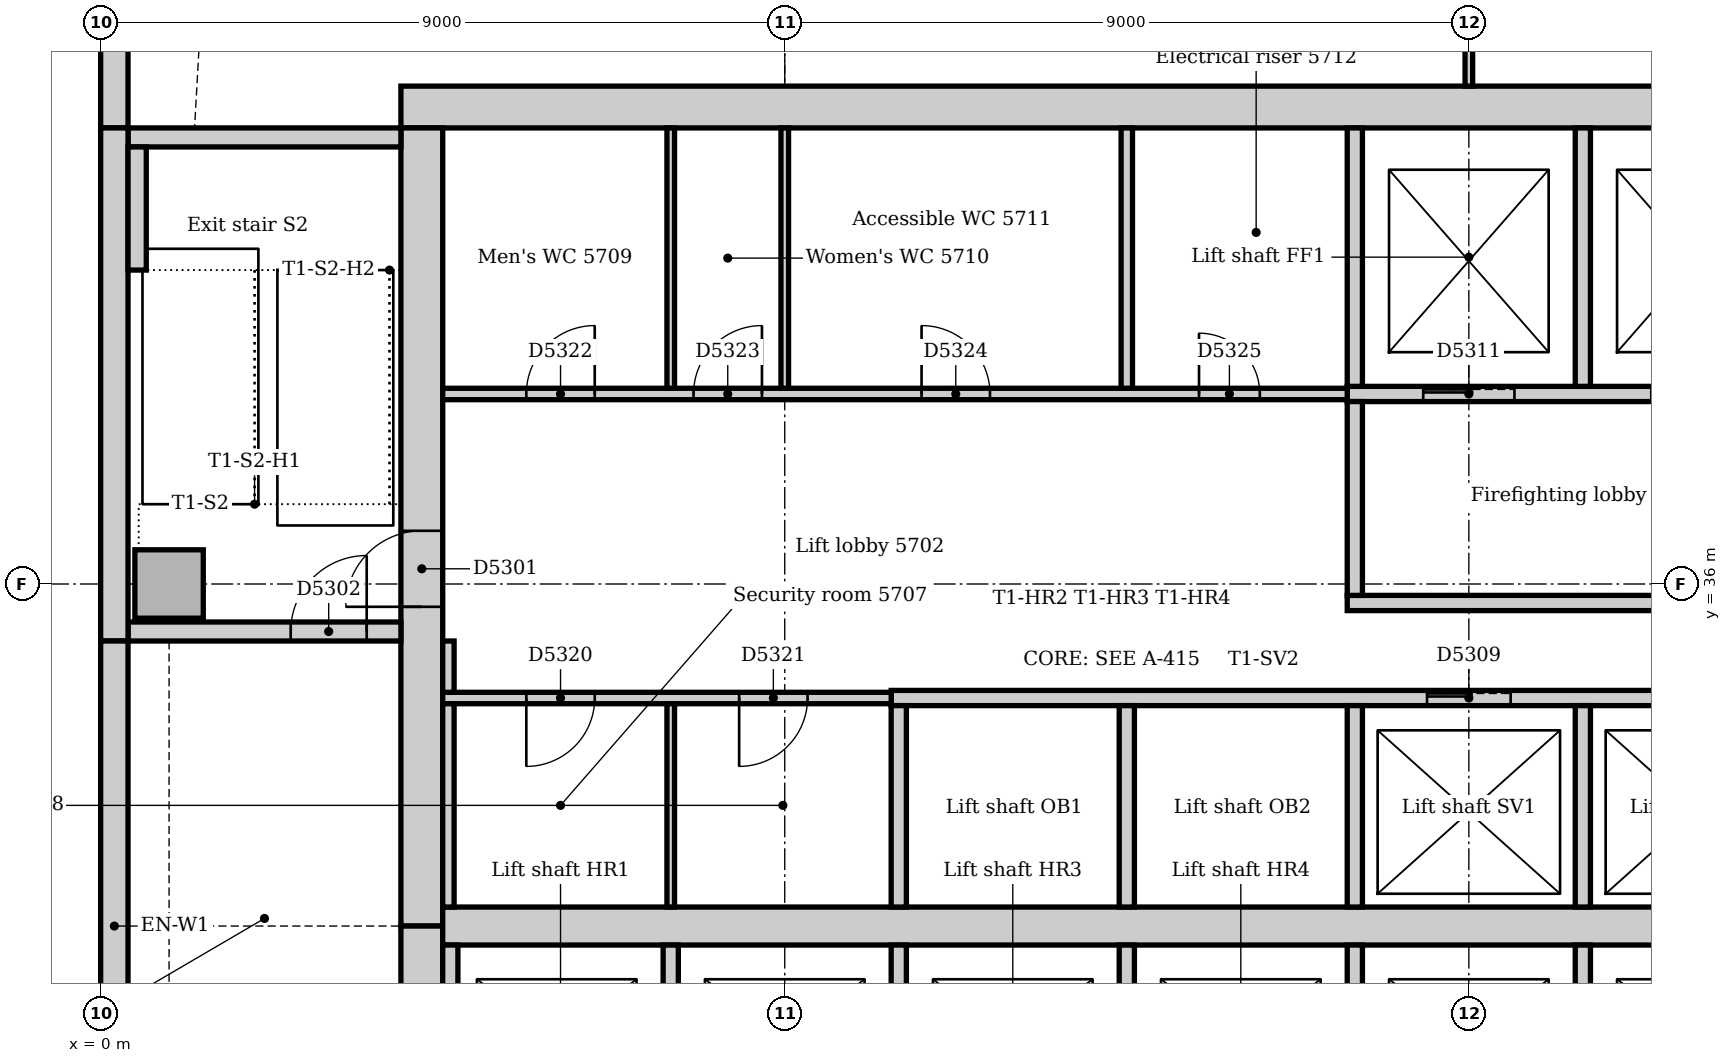
"""IFC4 building model, lengths in metres.
Left out: names, types, materials, properties, quantities, classifications, styles, units other than length and angle.
Written with IfcOpenShell. Run it as: python <this file> out.ifc"""

import sys

from ifc_helpers import new_model, si_unit, direction, frame, frame_2d, origin, origin_2d, place, context, subcontext, project, spatial, rectangle, extrude, element, fill, save


model = new_model("IFC4")
c1 = context("Model", 3, precision=1e-05, world=origin(), true_north=direction((0.0, 1.0)))
c2 = subcontext(c1, "Body", "Model", "MODEL_VIEW")
j1 = project(units=[si_unit("LENGTHUNIT", "METRE"), si_unit("PLANEANGLEUNIT", "RADIAN")], contexts=[c1])
p1 = place(None, origin())
s1 = spatial("IfcSite", under=j1, at=p1, CompositionType="ELEMENT")
p2 = place(p1, origin())
s2 = spatial("IfcBuilding", under=s1, at=p2, CompositionType="ELEMENT")
p3 = place(p2, frame((0.0, 0.0, 238.0)))
s3 = spatial("IfcBuildingStorey", under=s2, at=p3, CompositionType="ELEMENT", Elevation=238.0)
p4 = place(p3, frame((23.05, 42.275, 0.0), z_axis=(0.0, 0.0, 1.0), x_axis=(-1.0, 0.0, 0.0)))
e1 = element("IfcWall", 1, at=p4, inside=s3, PredefinedType="SOLIDWALL", context=c2, shape_type="SweptSolid", body=[
    extrude(rectangle(XDim=19.1, YDim=0.55, at=frame_2d((9.55, 0.0))), origin(), (0.0, 0.0, 1.0), 4.0),
])
p5 = place(p3, frame((4.225, 42.0, 0.0), z_axis=(0.0, 0.0, 1.0), x_axis=(0.0, -1.0, 0.0)))
e2 = element("IfcWall", 2, at=p5, inside=s3, PredefinedType="SOLIDWALL", context=c2, shape_type="SweptSolid", body=[
    extrude(rectangle(XDim=10.5, YDim=0.55, at=frame_2d((5.25, 0.0))), origin(), (0.0, 0.0, 1.0), 4.0),
])
p6 = place(p5, frame((5.3, 0.0, 0.0)))
e3 = element("IfcOpeningElement", 3, at=p6, cuts=e2, PredefinedType="OPENING", context=c2, shape_type="SweptSolid", body=[
    extrude(rectangle(XDim=1.0, YDim=2.1, at=frame_2d((0.5, 1.05))), frame((0.0, 0.285, 0.0), z_axis=(0.0, -1.0, 0.0), x_axis=(1.0, 0.0, 0.0)), (0.0, 0.0, 1.0), 0.57),
])
p7 = place(p3, frame((4.225, 31.5, 0.0), z_axis=(0.0, 0.0, 1.0), x_axis=(0.0, -1.0, 0.0)))
e4 = element("IfcWall", 4, at=p7, inside=s3, PredefinedType="SOLIDWALL", context=c2, shape_type="SweptSolid", body=[
    extrude(rectangle(XDim=10.5, YDim=0.55, at=frame_2d((5.25, 0.0))), origin(), (0.0, 0.0, 1.0), 4.0),
])
p8 = place(p7, frame((4.25, 0.0, 0.0)))
e5 = element("IfcOpeningElement", 5, at=p8, cuts=e4, PredefinedType="OPENING", context=c2, shape_type="SweptSolid", body=[
    extrude(rectangle(XDim=1.0, YDim=2.1, at=frame_2d((0.5, 1.05))), frame((0.0, 0.285, 0.0), z_axis=(0.0, -1.0, 0.0), x_axis=(1.0, 0.0, 0.0)), (0.0, 0.0, 1.0), 0.57),
])
p9 = place(p3, frame((4.5, 31.5, 0.0), z_axis=(0.0, 0.0, 1.0), x_axis=(1.0, 0.0, 0.0)))
e6 = element("IfcWall", 6, at=p9, inside=s3, PredefinedType="SOLIDWALL", context=c2, shape_type="SweptSolid", body=[
    extrude(rectangle(XDim=18.0, YDim=0.5, at=frame_2d((9.0, 0.0))), origin(), (0.0, 0.0, 1.0), 4.0),
])
p10 = place(p3, frame((0.36, 35.375, 0.0), z_axis=(0.0, 0.0, 1.0), x_axis=(1.0, 0.0, 0.0)))
e7 = element("IfcWall", 7, at=p10, inside=s3, PredefinedType="SOLIDWALL", context=c2, shape_type="SweptSolid", body=[
    extrude(rectangle(XDim=3.59, YDim=0.25, at=frame_2d((1.795, 0.0))), origin(), (0.0, 0.0, 1.0), 4.0),
])
p11 = place(p10, frame((2.14, 0.0, 0.0)))
e8 = element("IfcOpeningElement", 8, at=p11, cuts=e7, PredefinedType="OPENING", context=c2, shape_type="SweptSolid", body=[
    extrude(rectangle(XDim=1.0, YDim=2.1, at=frame_2d((0.5, 1.05))), frame((0.0, 0.135, 0.0), z_axis=(0.0, -1.0, 0.0), x_axis=(1.0, 0.0, 0.0)), (0.0, 0.0, 1.0), 0.27),
])
p12 = place(p3, frame((3.95, 41.875, 0.0), z_axis=(0.0, 0.0, 1.0), x_axis=(-1.0, 0.0, 0.0)))
e9 = element("IfcWall", 9, at=p12, inside=s3, PredefinedType="SOLIDWALL", context=c2, shape_type="SweptSolid", body=[
    extrude(rectangle(XDim=3.59, YDim=0.25, at=frame_2d((1.795, 0.0))), origin(), (0.0, 0.0, 1.0), 4.0),
])
p13 = place(p3, frame((0.9, 36.0, 0.0), z_axis=(0.0, 0.0, 1.0), x_axis=(1.0, 0.0, 0.0)))
e10 = element("IfcColumn", 10, at=p13, inside=s3, PredefinedType="COLUMN", context=c2, shape_type="SweptSolid", body=[
    extrude(rectangle(XDim=0.9, YDim=0.9, at=origin_2d()), origin(), (0.0, 0.0, 1.0), 4.0),
])
p14 = place(p3, frame((0.18, 54.257, 0.0), z_axis=(0.0, 0.0, 1.0), x_axis=(0.0, -1.0, 0.0)))
e11 = element("IfcWall", 11, at=p14, inside=s3, PredefinedType="STANDARD", context=c2, shape_type="SweptSolid", body=[
    extrude(rectangle(XDim=12.257, YDim=0.36, at=frame_2d((6.129, 0.0))), origin(), (0.0, 0.0, 1.0), 3.7),
])
p15 = place(p14, frame((4.207, 0.0, 0.9)))
e12 = element("IfcOpeningElement", 12, at=p15, cuts=e11, PredefinedType="OPENING", context=c2, shape_type="SweptSolid", body=[
    extrude(rectangle(XDim=1.8, YDim=1.6, at=frame_2d((0.9, 0.8))), frame((0.0, 0.19, 0.0), z_axis=(0.0, -1.0, 0.0), x_axis=(1.0, 0.0, 0.0)), (0.0, 0.0, 1.0), 0.38),
])
p16 = place(p14, frame((7.607, 0.0, 0.9)))
e13 = element("IfcOpeningElement", 13, at=p16, cuts=e11, PredefinedType="OPENING", context=c2, shape_type="SweptSolid", body=[
    extrude(rectangle(XDim=3.3, YDim=1.6, at=frame_2d((1.65, 0.8))), frame((0.0, 0.19, 0.0), z_axis=(0.0, -1.0, 0.0), x_axis=(1.0, 0.0, 0.0)), (0.0, 0.0, 1.0), 0.38),
])
p17 = place(p3, frame((0.18, 42.0, 0.0), z_axis=(0.0, 0.0, 1.0), x_axis=(0.0, -1.0, 0.0)))
e14 = element("IfcWall", 14, at=p17, inside=s3, PredefinedType="STANDARD", context=c2, shape_type="SweptSolid", body=[
    extrude(rectangle(XDim=6.75, YDim=0.36, at=frame_2d((3.375, 0.0))), origin(), (0.0, 0.0, 1.0), 3.7),
])
p18 = place(p3, frame((0.18, 35.25, 0.0), z_axis=(0.0, 0.0, 1.0), x_axis=(0.0, -1.0, 0.0)))
e15 = element("IfcWall", 15, at=p18, inside=s3, PredefinedType="STANDARD", context=c2, shape_type="SweptSolid", body=[
    extrude(rectangle(XDim=7.5, YDim=0.36, at=frame_2d((3.75, 0.0))), origin(), (0.0, 0.0, 1.0), 3.7),
])
p19 = place(p3, frame((0.48, 40.13, 0.0), z_axis=(0.0, 0.0, 1.0), x_axis=(0.0, 1.0, 0.0)))
e16 = element("IfcWall", 16, at=p19, inside=s3, PredefinedType="STANDARD", context=c2, shape_type="SweptSolid", body=[
    extrude(rectangle(XDim=1.62, YDim=0.24, at=frame_2d((0.81, 0.0))), origin(), (0.0, 0.0, 1.0), 4.0),
])
p20 = place(p3, frame((16.4, 35.75, 0.0), z_axis=(0.0, 0.0, 1.0), x_axis=(1.0, 0.0, 0.0)))
e17 = element("IfcWall", 17, at=p20, inside=s3, PredefinedType="PARTITIONING", context=c2, shape_type="SweptSolid", body=[
    extrude(rectangle(XDim=6.1, YDim=0.2, at=frame_2d((3.05, 0.0))), origin(), (0.0, 0.0, 1.0), 3.7),
])
p21 = place(p3, frame((16.4, 38.5, 0.0), z_axis=(0.0, 0.0, 1.0), x_axis=(1.0, 0.0, 0.0)))
e18 = element("IfcWall", 18, at=p21, inside=s3, PredefinedType="PARTITIONING", context=c2, shape_type="SweptSolid", body=[
    extrude(rectangle(XDim=6.1, YDim=0.2, at=frame_2d((3.05, 0.0))), origin(), (0.0, 0.0, 1.0), 3.7),
])
p22 = place(p21, frame((1.0, 0.0, 0.0)))
e19 = element("IfcOpeningElement", 19, at=p22, cuts=e18, PredefinedType="OPENING", context=c2, shape_type="SweptSolid", body=[
    extrude(rectangle(XDim=1.2, YDim=2.1, at=frame_2d((0.6, 1.05))), frame((0.0, 0.11, 0.0), z_axis=(0.0, -1.0, 0.0), x_axis=(1.0, 0.0, 0.0)), (0.0, 0.0, 1.0), 0.22),
])
p23 = place(p21, frame((4.0, 0.0, 0.0)))
e20 = element("IfcOpeningElement", 20, at=p23, cuts=e18, PredefinedType="OPENING", context=c2, shape_type="SweptSolid", body=[
    extrude(rectangle(XDim=1.2, YDim=2.1, at=frame_2d((0.6, 1.05))), frame((0.0, 0.11, 0.0), z_axis=(0.0, -1.0, 0.0), x_axis=(1.0, 0.0, 0.0)), (0.0, 0.0, 1.0), 0.22),
])
p24 = place(p3, frame((16.5, 35.85, 0.0), z_axis=(0.0, 0.0, 1.0), x_axis=(0.0, 1.0, 0.0)))
e21 = element("IfcWall", 21, at=p24, inside=s3, PredefinedType="PARTITIONING", context=c2, shape_type="SweptSolid", body=[
    extrude(rectangle(XDim=2.55, YDim=0.2, at=frame_2d((1.275, 0.0))), origin(), (0.0, 0.0, 1.0), 3.7),
])
p25 = place(p3, frame((10.4, 34.5, 0.0), z_axis=(0.0, 0.0, 1.0), x_axis=(1.0, 0.0, 0.0)))
e22 = element("IfcWall", 22, at=p25, inside=s3, PredefinedType="PARTITIONING", context=c2, shape_type="SweptSolid", body=[
    extrude(rectangle(XDim=12.1, YDim=0.2, at=frame_2d((6.05, 0.0))), origin(), (0.0, 0.0, 1.0), 3.7),
])
p26 = place(p25, frame((7.05, 0.0, 0.0)))
e23 = element("IfcOpeningElement", 23, at=p26, cuts=e22, PredefinedType="OPENING", context=c2, shape_type="SweptSolid", body=[
    extrude(rectangle(XDim=1.1, YDim=2.1, at=frame_2d((0.55, 1.05))), frame((0.0, 0.11, 0.0), z_axis=(0.0, -1.0, 0.0), x_axis=(1.0, 0.0, 0.0)), (0.0, 0.0, 1.0), 0.22),
])
p27 = place(p25, frame((10.05, 0.0, 0.0)))
e24 = element("IfcOpeningElement", 24, at=p27, cuts=e22, PredefinedType="OPENING", context=c2, shape_type="SweptSolid", body=[
    extrude(rectangle(XDim=1.1, YDim=2.1, at=frame_2d((0.55, 1.05))), frame((0.0, 0.11, 0.0), z_axis=(0.0, -1.0, 0.0), x_axis=(1.0, 0.0, 0.0)), (0.0, 0.0, 1.0), 0.22),
])
for number, where, z_axis, x_axis in (
    (25, (10.5, 28.6, 0.0), (0.0, 0.0, 1.0), (0.0, 1.0, 0.0)),
    (26, (10.5, 31.75, 0.0), (0.0, 0.0, 1.0), (0.0, 1.0, 0.0)),
    (27, (13.5, 28.6, 0.0), (0.0, 0.0, 1.0), (0.0, 1.0, 0.0)),
    (28, (13.5, 31.75, 0.0), (0.0, 0.0, 1.0), (0.0, 1.0, 0.0)),
    (29, (16.5, 28.6, 0.0), (0.0, 0.0, 1.0), (0.0, 1.0, 0.0)),
    (30, (16.5, 31.75, 0.0), (0.0, 0.0, 1.0), (0.0, 1.0, 0.0)),
    (31, (19.5, 28.6, 0.0), (0.0, 0.0, 1.0), (0.0, 1.0, 0.0)),
    (32, (19.5, 31.75, 0.0), (0.0, 0.0, 1.0), (0.0, 1.0, 0.0)),
):
    element("IfcWall", number, at=place(p3, frame(where, z_axis=z_axis, x_axis=x_axis)), inside=s3, PredefinedType="PARTITIONING", context=c2, shape_type="SweptSolid", body=[
        extrude(rectangle(XDim=2.65, YDim=0.2, at=frame_2d((1.325, 0.0))), origin(), (0.0, 0.0, 1.0), 3.7),
    ])
for number, where, z_axis, x_axis in (
    (33, (16.5, 38.6, 0.0), (0.0, 0.0, 1.0), (0.0, 1.0, 0.0)),
    (34, (19.5, 38.6, 0.0), (0.0, 0.0, 1.0), (0.0, 1.0, 0.0)),
):
    element("IfcWall", number, at=place(p3, frame(where, z_axis=z_axis, x_axis=x_axis)), inside=s3, PredefinedType="PARTITIONING", context=c2, shape_type="SweptSolid", body=[
        extrude(rectangle(XDim=3.4, YDim=0.2, at=frame_2d((1.7, 0.0))), origin(), (0.0, 0.0, 1.0), 3.7),
    ])
for number, where, z_axis, x_axis in (
    (35, (4.6, 28.6, 0.0), (0.0, 0.0, 1.0), (0.0, 1.0, 0.0)),
    (36, (7.5, 28.6, 0.0), (0.0, 0.0, 1.0), (0.0, 1.0, 0.0)),
):
    element("IfcWall", number, at=place(p3, frame(where, z_axis=z_axis, x_axis=x_axis)), inside=s3, PredefinedType="PARTITIONING", context=c2, shape_type="SweptSolid", body=[
        extrude(rectangle(XDim=2.65, YDim=0.2, at=frame_2d((1.325, 0.0))), origin(), (0.0, 0.0, 1.0), 3.7),
    ])
p28 = place(p3, frame((4.5, 38.5, 0.0), z_axis=(0.0, 0.0, 1.0), x_axis=(1.0, 0.0, 0.0)))
e37 = element("IfcWall", 37, at=p28, inside=s3, PredefinedType="PARTITIONING", context=c2, shape_type="SweptSolid", body=[
    extrude(rectangle(XDim=11.9, YDim=0.15, at=frame_2d((5.95, 0.0))), origin(), (0.0, 0.0, 1.0), 3.7),
])
p29 = place(p28, frame((1.1, 0.0, 0.0)))
e38 = element("IfcOpeningElement", 38, at=p29, cuts=e37, PredefinedType="OPENING", context=c2, shape_type="SweptSolid", body=[
    extrude(rectangle(XDim=0.9, YDim=2.1, at=frame_2d((0.45, 1.05))), frame((0.0, 0.085, 0.0), z_axis=(0.0, -1.0, 0.0), x_axis=(1.0, 0.0, 0.0)), (0.0, 0.0, 1.0), 0.17),
])
p30 = place(p28, frame((3.3, 0.0, 0.0)))
e39 = element("IfcOpeningElement", 39, at=p30, cuts=e37, PredefinedType="OPENING", context=c2, shape_type="SweptSolid", body=[
    extrude(rectangle(XDim=0.9, YDim=2.1, at=frame_2d((0.45, 1.05))), frame((0.0, 0.085, 0.0), z_axis=(0.0, -1.0, 0.0), x_axis=(1.0, 0.0, 0.0)), (0.0, 0.0, 1.0), 0.17),
])
p31 = place(p28, frame((6.3, 0.0, 0.0)))
e40 = element("IfcOpeningElement", 40, at=p31, cuts=e37, PredefinedType="OPENING", context=c2, shape_type="SweptSolid", body=[
    extrude(rectangle(XDim=0.9, YDim=2.1, at=frame_2d((0.45, 1.05))), frame((0.0, 0.085, 0.0), z_axis=(0.0, -1.0, 0.0), x_axis=(1.0, 0.0, 0.0)), (0.0, 0.0, 1.0), 0.17),
])
p32 = place(p28, frame((9.95, 0.0, 0.0)))
e41 = element("IfcOpeningElement", 41, at=p32, cuts=e37, PredefinedType="OPENING", context=c2, shape_type="SweptSolid", body=[
    extrude(rectangle(XDim=0.8, YDim=2.1, at=frame_2d((0.4, 1.05))), frame((0.0, 0.085, 0.0), z_axis=(0.0, -1.0, 0.0), x_axis=(1.0, 0.0, 0.0)), (0.0, 0.0, 1.0), 0.17),
])
p33 = place(p3, frame((4.5, 34.5, 0.0), z_axis=(0.0, 0.0, 1.0), x_axis=(1.0, 0.0, 0.0)))
e42 = element("IfcWall", 42, at=p33, inside=s3, PredefinedType="PARTITIONING", context=c2, shape_type="SweptSolid", body=[
    extrude(rectangle(XDim=5.9, YDim=0.15, at=frame_2d((2.95, 0.0))), origin(), (0.0, 0.0, 1.0), 3.7),
])
p34 = place(p33, frame((1.1, 0.0, 0.0)))
e43 = element("IfcOpeningElement", 43, at=p34, cuts=e42, PredefinedType="OPENING", context=c2, shape_type="SweptSolid", body=[
    extrude(rectangle(XDim=0.9, YDim=2.1, at=frame_2d((0.45, 1.05))), frame((0.0, 0.085, 0.0), z_axis=(0.0, -1.0, 0.0), x_axis=(1.0, 0.0, 0.0)), (0.0, 0.0, 1.0), 0.17),
])
p35 = place(p33, frame((3.9, 0.0, 0.0)))
e44 = element("IfcOpeningElement", 44, at=p35, cuts=e42, PredefinedType="OPENING", context=c2, shape_type="SweptSolid", body=[
    extrude(rectangle(XDim=0.9, YDim=2.1, at=frame_2d((0.45, 1.05))), frame((0.0, 0.085, 0.0), z_axis=(0.0, -1.0, 0.0), x_axis=(1.0, 0.0, 0.0)), (0.0, 0.0, 1.0), 0.17),
])
p36 = place(p3, frame((4.575, 34.575, 0.0), z_axis=(0.0, 0.0, 1.0), x_axis=(0.0, 1.0, 0.0)))
e45 = element("IfcWall", 45, at=p36, inside=s3, PredefinedType="PARTITIONING", context=c2, shape_type="SweptSolid", body=[
    extrude(rectangle(XDim=0.675, YDim=0.15, at=frame_2d((0.338, 0.0))), origin(), (0.0, 0.0, 1.0), 3.7),
])
p37 = place(p3, frame((4.575, 31.75, 0.0), z_axis=(0.0, 0.0, 1.0), x_axis=(0.0, 1.0, 0.0)))
e46 = element("IfcWall", 46, at=p37, inside=s3, PredefinedType="PARTITIONING", context=c2, shape_type="SweptSolid", body=[
    extrude(rectangle(XDim=2.675, YDim=0.15, at=frame_2d((1.337, 0.0))), origin(), (0.0, 0.0, 1.0), 3.7),
])
p38 = place(p3, frame((13.5, 38.575, 0.0), z_axis=(0.0, 0.0, 1.0), x_axis=(0.0, 1.0, 0.0)))
e47 = element("IfcWall", 47, at=p38, inside=s3, PredefinedType="PARTITIONING", context=c2, shape_type="SweptSolid", body=[
    extrude(rectangle(XDim=3.425, YDim=0.15, at=frame_2d((1.712, 0.0))), origin(), (0.0, 0.0, 1.0), 3.7),
])
p39 = place(p3, frame((18.0, 42.55, 0.0), z_axis=(0.0, 0.0, 1.0), x_axis=(0.0, 1.0, 0.0)))
e48 = element("IfcWall", 48, at=p39, inside=s3, PredefinedType="PARTITIONING", context=c2, shape_type="SweptSolid", body=[
    extrude(rectangle(XDim=1.15, YDim=0.1, at=frame_2d((0.575, 0.0))), origin(), (0.0, 0.0, 1.0), 3.502),
])
for number, where, z_axis, x_axis in (
    (49, (7.5, 38.575, 0.0), (0.0, 0.0, 1.0), (0.0, 1.0, 0.0)),
    (50, (9.0, 38.575, 0.0), (0.0, 0.0, 1.0), (0.0, 1.0, 0.0)),
):
    element("IfcWall", number, at=place(p3, frame(where, z_axis=z_axis, x_axis=x_axis)), inside=s3, PredefinedType="PARTITIONING", context=c2, shape_type="SweptSolid", body=[
        extrude(rectangle(XDim=3.425, YDim=0.1, at=frame_2d((1.712, 0.0))), origin(), (0.0, 0.0, 1.0), 3.7),
    ])
p40 = place(p3, frame((7.5, 31.75, 0.0), z_axis=(0.0, 0.0, 1.0), x_axis=(0.0, 1.0, 0.0)))
e51 = element("IfcWall", 51, at=p40, inside=s3, PredefinedType="PARTITIONING", context=c2, shape_type="SweptSolid", body=[
    extrude(rectangle(XDim=2.675, YDim=0.1, at=frame_2d((1.337, 0.0))), origin(), (0.0, 0.0, 1.0), 3.7),
])
p41 = place(p6, frame((1.0, 0.0, 0.0), z_axis=(0.0, 0.0, 1.0), x_axis=(-1.0, 0.0, 0.0)))
e52 = element("IfcDoor", 52, at=p41, inside=s3, OperationType="SINGLE_SWING_LEFT", PredefinedType="DOOR", context=c2, shape_type="SweptSolid", body=[
    extrude(rectangle(XDim=1.0, YDim=2.1, at=frame_2d((0.5, 1.05))), frame((0.0, 0.025, 0.0), z_axis=(0.0, -1.0, 0.0), x_axis=(1.0, 0.0, 0.0)), (0.0, 0.0, 1.0), 0.05),
])
fill(e3, e52)
p42 = place(p11, origin())
e53 = element("IfcDoor", 53, at=p42, inside=s3, OperationType="SINGLE_SWING_RIGHT", PredefinedType="DOOR", context=c2, shape_type="SweptSolid", body=[
    extrude(rectangle(XDim=1.0, YDim=2.1, at=frame_2d((0.5, 1.05))), frame((0.0, 0.025, 0.0), z_axis=(0.0, -1.0, 0.0), x_axis=(1.0, 0.0, 0.0)), (0.0, 0.0, 1.0), 0.05),
])
fill(e8, e53)
p43 = place(p26, origin())
e54 = element("IfcDoor", 54, at=p43, inside=s3, OperationType="SLIDING_TO_LEFT", PredefinedType="DOOR", context=c2, shape_type="SweptSolid", body=[
    extrude(rectangle(XDim=1.1, YDim=2.1, at=frame_2d((0.55, 1.05))), frame((0.0, 0.025, 0.0), z_axis=(0.0, -1.0, 0.0), x_axis=(1.0, 0.0, 0.0)), (0.0, 0.0, 1.0), 0.05),
])
fill(e23, e54)
p44 = place(p22, origin())
e55 = element("IfcDoor", 55, at=p44, inside=s3, OperationType="SLIDING_TO_LEFT", PredefinedType="DOOR", context=c2, shape_type="SweptSolid", body=[
    extrude(rectangle(XDim=1.2, YDim=2.1, at=frame_2d((0.6, 1.05))), frame((0.0, 0.025, 0.0), z_axis=(0.0, -1.0, 0.0), x_axis=(1.0, 0.0, 0.0)), (0.0, 0.0, 1.0), 0.05),
])
fill(e19, e55)
p45 = place(p34, frame((0.9, 0.0, 0.0), z_axis=(0.0, 0.0, 1.0), x_axis=(-1.0, 0.0, 0.0)))
e56 = element("IfcDoor", 56, at=p45, inside=s3, OperationType="SINGLE_SWING_RIGHT", PredefinedType="DOOR", context=c2, shape_type="SweptSolid", body=[
    extrude(rectangle(XDim=0.9, YDim=2.1, at=frame_2d((0.45, 1.05))), frame((0.0, 0.025, 0.0), z_axis=(0.0, -1.0, 0.0), x_axis=(1.0, 0.0, 0.0)), (0.0, 0.0, 1.0), 0.05),
])
fill(e43, e56)
p46 = place(p35, frame((0.9, 0.0, 0.0), z_axis=(0.0, 0.0, 1.0), x_axis=(-1.0, 0.0, 0.0)))
e57 = element("IfcDoor", 57, at=p46, inside=s3, OperationType="SINGLE_SWING_RIGHT", PredefinedType="DOOR", context=c2, shape_type="SweptSolid", body=[
    extrude(rectangle(XDim=0.9, YDim=2.1, at=frame_2d((0.45, 1.05))), frame((0.0, 0.025, 0.0), z_axis=(0.0, -1.0, 0.0), x_axis=(1.0, 0.0, 0.0)), (0.0, 0.0, 1.0), 0.05),
])
fill(e44, e57)
p47 = place(p29, origin())
e58 = element("IfcDoor", 58, at=p47, inside=s3, OperationType="SINGLE_SWING_RIGHT", PredefinedType="DOOR", context=c2, shape_type="SweptSolid", body=[
    extrude(rectangle(XDim=0.9, YDim=2.1, at=frame_2d((0.45, 1.05))), frame((0.0, 0.025, 0.0), z_axis=(0.0, -1.0, 0.0), x_axis=(1.0, 0.0, 0.0)), (0.0, 0.0, 1.0), 0.05),
])
fill(e38, e58)
p48 = place(p30, origin())
e59 = element("IfcDoor", 59, at=p48, inside=s3, OperationType="SINGLE_SWING_RIGHT", PredefinedType="DOOR", context=c2, shape_type="SweptSolid", body=[
    extrude(rectangle(XDim=0.9, YDim=2.1, at=frame_2d((0.45, 1.05))), frame((0.0, 0.025, 0.0), z_axis=(0.0, -1.0, 0.0), x_axis=(1.0, 0.0, 0.0)), (0.0, 0.0, 1.0), 0.05),
])
fill(e39, e59)
p49 = place(p31, origin())
e60 = element("IfcDoor", 60, at=p49, inside=s3, OperationType="SINGLE_SWING_LEFT", PredefinedType="DOOR", context=c2, shape_type="SweptSolid", body=[
    extrude(rectangle(XDim=0.9, YDim=2.1, at=frame_2d((0.45, 1.05))), frame((0.0, 0.025, 0.0), z_axis=(0.0, -1.0, 0.0), x_axis=(1.0, 0.0, 0.0)), (0.0, 0.0, 1.0), 0.05),
])
fill(e40, e60)
p50 = place(p32, origin())
e61 = element("IfcDoor", 61, at=p50, inside=s3, OperationType="SINGLE_SWING_LEFT", PredefinedType="DOOR", context=c2, shape_type="SweptSolid", body=[
    extrude(rectangle(XDim=0.8, YDim=2.1, at=frame_2d((0.4, 1.05))), frame((0.0, 0.025, 0.0), z_axis=(0.0, -1.0, 0.0), x_axis=(1.0, 0.0, 0.0)), (0.0, 0.0, 1.0), 0.05),
])
fill(e41, e61)
save(model, sys.argv[1])
